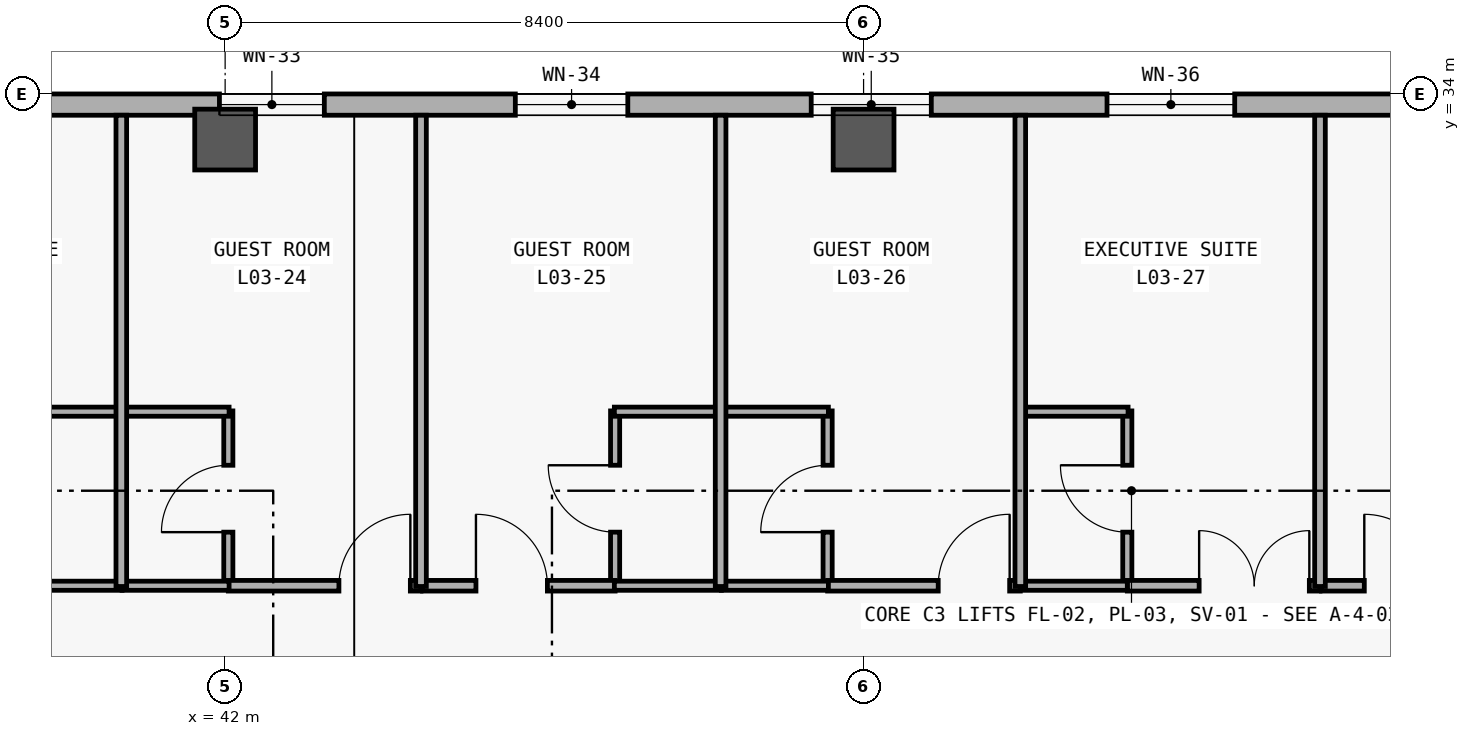
"""IFC4 building model, lengths in metres.
Left out: names, types, materials, properties, quantities, classifications, styles, units other than length and angle.
Written with IfcOpenShell. Run it as: python <this file> out.ifc"""

import sys

from ifc_helpers import new_model, si_unit, direction, frame, frame_2d, origin, origin_2d, place, context, subcontext, project, spatial, rectangle, extrude, element, fill, save


model = new_model("IFC4")
c1 = context("Model", 3, precision=1e-05, world=origin(), true_north=direction((0.0, 1.0)))
c2 = subcontext(c1, "Body", "Model", "MODEL_VIEW")
j1 = project(units=[si_unit("LENGTHUNIT", "METRE"), si_unit("PLANEANGLEUNIT", "RADIAN")], contexts=[c1])
p1 = place(None, origin())
s1 = spatial("IfcSite", under=j1, at=p1, CompositionType="ELEMENT")
p2 = place(p1, origin())
s2 = spatial("IfcBuilding", under=s1, at=p2, CompositionType="ELEMENT")
p3 = place(p2, frame((0.0, 0.0, 15.0)))
s3 = spatial("IfcBuildingStorey", under=s2, at=p3, CompositionType="ELEMENT", Elevation=15.0)
for number, where, z_axis, x_axis in (
    (1, (42.0, 33.4, 0.0), (0.0, 0.0, 1.0), (1.0, 0.0, 0.0)),
    (2, (50.4, 33.4, 0.0), (0.0, 0.0, 1.0), (1.0, 0.0, 0.0)),
):
    element("IfcColumn", number, at=place(p3, frame(where, z_axis=z_axis, x_axis=x_axis)), inside=s3, PredefinedType="COLUMN", context=c2, shape_type="SweptSolid", body=[
        extrude(rectangle(XDim=0.8, YDim=0.8, at=origin_2d()), origin(), (0.0, 0.0, 1.0), 4.2),
    ])
p4 = place(p3, frame((8.68, 33.86, 0.0), z_axis=(0.0, 0.0, 1.0), x_axis=(1.0, 0.0, 0.0)))
e3 = element("IfcWall", 3, at=p4, inside=s3, PredefinedType="SOLIDWALL", context=c2, shape_type="SweptSolid", body=[
    extrude(rectangle(XDim=83.44, YDim=0.28, at=frame_2d((41.72, 0.0))), origin(), (0.0, 0.0, 1.0), 3.92),
])
p5 = place(p4, frame((4.895, 0.0, 0.85)))
e4 = element("IfcOpeningElement", 4, at=p5, cuts=e3, PredefinedType="OPENING", context=c2, shape_type="SweptSolid", body=[
    extrude(rectangle(XDim=2.6, YDim=2.2, at=frame_2d((1.3, 1.1))), frame((0.0, 0.15, 0.0), z_axis=(0.0, -1.0, 0.0), x_axis=(1.0, 0.0, 0.0)), (0.0, 0.0, 1.0), 0.3),
])
p6 = place(p4, frame((13.371, 0.0, 0.85)))
e5 = element("IfcOpeningElement", 5, at=p6, cuts=e3, PredefinedType="OPENING", context=c2, shape_type="SweptSolid", body=[
    extrude(rectangle(XDim=1.7, YDim=2.0, at=frame_2d((0.85, 1.0))), frame((0.0, 0.15, 0.0), z_axis=(0.0, -1.0, 0.0), x_axis=(1.0, 0.0, 0.0)), (0.0, 0.0, 1.0), 0.3),
])
p7 = place(p4, frame((17.015, 0.0, 0.85)))
e6 = element("IfcOpeningElement", 6, at=p7, cuts=e3, PredefinedType="OPENING", context=c2, shape_type="SweptSolid", body=[
    extrude(rectangle(XDim=2.3, YDim=2.05, at=frame_2d((1.15, 1.025))), frame((0.0, 0.15, 0.0), z_axis=(0.0, -1.0, 0.0), x_axis=(1.0, 0.0, 0.0)), (0.0, 0.0, 1.0), 0.3),
])
p8 = place(p4, frame((20.732, 0.0, 0.85)))
e7 = element("IfcOpeningElement", 7, at=p8, cuts=e3, PredefinedType="OPENING", context=c2, shape_type="SweptSolid", body=[
    extrude(rectangle(XDim=2.75, YDim=2.1, at=frame_2d((1.375, 1.05))), frame((0.0, 0.15, 0.0), z_axis=(0.0, -1.0, 0.0), x_axis=(1.0, 0.0, 0.0)), (0.0, 0.0, 1.0), 0.3),
])
p9 = place(p4, frame((25.46, 0.0, 0.85)))
e8 = element("IfcOpeningElement", 8, at=p9, cuts=e3, PredefinedType="OPENING", context=c2, shape_type="SweptSolid", body=[
    extrude(rectangle(XDim=1.18, YDim=1.5, at=frame_2d((0.59, 0.75))), frame((0.0, 0.15, 0.0), z_axis=(0.0, -1.0, 0.0), x_axis=(1.0, 0.0, 0.0)), (0.0, 0.0, 1.0), 0.3),
])
p10 = place(p4, frame((29.352, 0.0, 0.85)))
e9 = element("IfcOpeningElement", 9, at=p10, cuts=e3, PredefinedType="OPENING", context=c2, shape_type="SweptSolid", body=[
    extrude(rectangle(XDim=1.28, YDim=1.6, at=frame_2d((0.64, 0.8))), frame((0.0, 0.15, 0.0), z_axis=(0.0, -1.0, 0.0), x_axis=(1.0, 0.0, 0.0)), (0.0, 0.0, 1.0), 0.3),
])
p11 = place(p4, frame((33.245, 0.0, 0.85)))
e10 = element("IfcOpeningElement", 10, at=p11, cuts=e3, PredefinedType="OPENING", context=c2, shape_type="SweptSolid", body=[
    extrude(rectangle(XDim=1.38, YDim=1.7, at=frame_2d((0.69, 0.85))), frame((0.0, 0.15, 0.0), z_axis=(0.0, -1.0, 0.0), x_axis=(1.0, 0.0, 0.0)), (0.0, 0.0, 1.0), 0.3),
])
p12 = place(p4, frame((37.138, 0.0, 0.85)))
e11 = element("IfcOpeningElement", 11, at=p12, cuts=e3, PredefinedType="OPENING", context=c2, shape_type="SweptSolid", body=[
    extrude(rectangle(XDim=1.48, YDim=1.8, at=frame_2d((0.74, 0.9))), frame((0.0, 0.15, 0.0), z_axis=(0.0, -1.0, 0.0), x_axis=(1.0, 0.0, 0.0)), (0.0, 0.0, 1.0), 0.3),
])
p13 = place(p4, frame((41.031, 0.0, 0.85)))
e12 = element("IfcOpeningElement", 12, at=p13, cuts=e3, PredefinedType="OPENING", context=c2, shape_type="SweptSolid", body=[
    extrude(rectangle(XDim=1.58, YDim=1.85, at=frame_2d((0.79, 0.925))), frame((0.0, 0.15, 0.0), z_axis=(0.0, -1.0, 0.0), x_axis=(1.0, 0.0, 0.0)), (0.0, 0.0, 1.0), 0.3),
])
p14 = place(p4, frame((44.923, 0.0, 0.85)))
e13 = element("IfcOpeningElement", 13, at=p14, cuts=e3, PredefinedType="OPENING", context=c2, shape_type="SweptSolid", body=[
    extrude(rectangle(XDim=1.68, YDim=1.9, at=frame_2d((0.84, 0.95))), frame((0.0, 0.15, 0.0), z_axis=(0.0, -1.0, 0.0), x_axis=(1.0, 0.0, 0.0)), (0.0, 0.0, 1.0), 0.3),
])
p15 = place(p4, frame((48.816, 0.0, 0.85)))
e14 = element("IfcOpeningElement", 14, at=p15, cuts=e3, PredefinedType="OPENING", context=c2, shape_type="SweptSolid", body=[
    extrude(rectangle(XDim=1.78, YDim=1.95, at=frame_2d((0.89, 0.975))), frame((0.0, 0.15, 0.0), z_axis=(0.0, -1.0, 0.0), x_axis=(1.0, 0.0, 0.0)), (0.0, 0.0, 1.0), 0.3),
])
p16 = place(p4, frame((52.71, 0.0, 0.85)))
e15 = element("IfcOpeningElement", 15, at=p16, cuts=e3, PredefinedType="OPENING", context=c2, shape_type="SweptSolid", body=[
    extrude(rectangle(XDim=1.88, YDim=1.95, at=frame_2d((0.94, 0.975))), frame((0.0, 0.15, 0.0), z_axis=(0.0, -1.0, 0.0), x_axis=(1.0, 0.0, 0.0)), (0.0, 0.0, 1.0), 0.3),
])
p17 = place(p4, frame((56.567, 0.0, 0.85)))
e16 = element("IfcOpeningElement", 16, at=p17, cuts=e3, PredefinedType="OPENING", context=c2, shape_type="SweptSolid", body=[
    extrude(rectangle(XDim=2.05, YDim=1.95, at=frame_2d((1.025, 0.975))), frame((0.0, 0.15, 0.0), z_axis=(0.0, -1.0, 0.0), x_axis=(1.0, 0.0, 0.0)), (0.0, 0.0, 1.0), 0.3),
])
p18 = place(p4, frame((60.444, 0.0, 0.85)))
e17 = element("IfcOpeningElement", 17, at=p18, cuts=e3, PredefinedType="OPENING", context=c2, shape_type="SweptSolid", body=[
    extrude(rectangle(XDim=2.18, YDim=1.95, at=frame_2d((1.09, 0.975))), frame((0.0, 0.15, 0.0), z_axis=(0.0, -1.0, 0.0), x_axis=(1.0, 0.0, 0.0)), (0.0, 0.0, 1.0), 0.3),
])
p19 = place(p4, frame((64.287, 0.0, 0.85)))
e18 = element("IfcOpeningElement", 18, at=p19, cuts=e3, PredefinedType="OPENING", context=c2, shape_type="SweptSolid", body=[
    extrude(rectangle(XDim=2.38, YDim=1.95, at=frame_2d((1.19, 0.975))), frame((0.0, 0.15, 0.0), z_axis=(0.0, -1.0, 0.0), x_axis=(1.0, 0.0, 0.0)), (0.0, 0.0, 1.0), 0.3),
])
p20 = place(p4, frame((68.181, 0.0, 0.85)))
e19 = element("IfcOpeningElement", 19, at=p20, cuts=e3, PredefinedType="OPENING", context=c2, shape_type="SweptSolid", body=[
    extrude(rectangle(XDim=2.48, YDim=2.0, at=frame_2d((1.24, 1.0))), frame((0.0, 0.15, 0.0), z_axis=(0.0, -1.0, 0.0), x_axis=(1.0, 0.0, 0.0)), (0.0, 0.0, 1.0), 0.3),
])
p21 = place(p4, frame((72.038, 0.0, 0.85)))
e20 = element("IfcOpeningElement", 20, at=p21, cuts=e3, PredefinedType="OPENING", context=c2, shape_type="SweptSolid", body=[
    extrude(rectangle(XDim=2.65, YDim=2.0, at=frame_2d((1.325, 1.0))), frame((0.0, 0.15, 0.0), z_axis=(0.0, -1.0, 0.0), x_axis=(1.0, 0.0, 0.0)), (0.0, 0.0, 1.0), 0.3),
])
p22 = place(p4, frame((75.831, 0.0, 0.85)))
e21 = element("IfcOpeningElement", 21, at=p22, cuts=e3, PredefinedType="OPENING", context=c2, shape_type="SweptSolid", body=[
    extrude(rectangle(XDim=2.95, YDim=2.05, at=frame_2d((1.475, 1.025))), frame((0.0, 0.15, 0.0), z_axis=(0.0, -1.0, 0.0), x_axis=(1.0, 0.0, 0.0)), (0.0, 0.0, 1.0), 0.3),
])
p23 = place(p4, frame((80.349, 0.0, 0.85)))
e22 = element("IfcOpeningElement", 22, at=p23, cuts=e3, PredefinedType="OPENING", context=c2, shape_type="SweptSolid", body=[
    extrude(rectangle(XDim=1.8, YDim=1.8, at=frame_2d((0.9, 0.9))), frame((0.0, 0.15, 0.0), z_axis=(0.0, -1.0, 0.0), x_axis=(1.0, 0.0, 0.0)), (0.0, 0.0, 1.0), 0.3),
])
p24 = place(p3, frame((42.042, 27.52, 0.0), z_axis=(0.0, 0.0, 1.0), x_axis=(0.0, 1.0, 0.0)))
e23 = element("IfcWall", 23, at=p24, inside=s3, PredefinedType="PARTITIONING", context=c2, shape_type="SweptSolid", body=[
    extrude(rectangle(XDim=2.31, YDim=0.12, at=frame_2d((1.155, 0.0))), origin(), (0.0, 0.0, 1.0), 3.02),
])
p25 = place(p24, frame((0.715, 0.0, 0.0)))
e24 = element("IfcOpeningElement", 24, at=p25, cuts=e23, PredefinedType="OPENING", context=c2, shape_type="SweptSolid", body=[
    extrude(rectangle(XDim=0.88, YDim=2.15, at=frame_2d((0.44, 1.075))), frame((0.0, 0.07, 0.0), z_axis=(0.0, -1.0, 0.0), x_axis=(1.0, 0.0, 0.0)), (0.0, 0.0, 1.0), 0.14),
])
p26 = place(p3, frame((47.131, 27.52, 0.0), z_axis=(0.0, 0.0, 1.0), x_axis=(0.0, 1.0, 0.0)))
e25 = element("IfcWall", 25, at=p26, inside=s3, PredefinedType="PARTITIONING", context=c2, shape_type="SweptSolid", body=[
    extrude(rectangle(XDim=2.31, YDim=0.12, at=frame_2d((1.155, 0.0))), origin(), (0.0, 0.0, 1.0), 3.02),
])
p27 = place(p26, frame((0.715, 0.0, 0.0)))
e26 = element("IfcOpeningElement", 26, at=p27, cuts=e25, PredefinedType="OPENING", context=c2, shape_type="SweptSolid", body=[
    extrude(rectangle(XDim=0.88, YDim=2.15, at=frame_2d((0.44, 1.075))), frame((0.0, 0.07, 0.0), z_axis=(0.0, -1.0, 0.0), x_axis=(1.0, 0.0, 0.0)), (0.0, 0.0, 1.0), 0.14),
])
p28 = place(p3, frame((49.927, 27.52, 0.0), z_axis=(0.0, 0.0, 1.0), x_axis=(0.0, 1.0, 0.0)))
e27 = element("IfcWall", 27, at=p28, inside=s3, PredefinedType="PARTITIONING", context=c2, shape_type="SweptSolid", body=[
    extrude(rectangle(XDim=2.31, YDim=0.12, at=frame_2d((1.155, 0.0))), origin(), (0.0, 0.0, 1.0), 3.02),
])
p29 = place(p28, frame((0.715, 0.0, 0.0)))
e28 = element("IfcOpeningElement", 28, at=p29, cuts=e27, PredefinedType="OPENING", context=c2, shape_type="SweptSolid", body=[
    extrude(rectangle(XDim=0.88, YDim=2.15, at=frame_2d((0.44, 1.075))), frame((0.0, 0.07, 0.0), z_axis=(0.0, -1.0, 0.0), x_axis=(1.0, 0.0, 0.0)), (0.0, 0.0, 1.0), 0.14),
])
p30 = place(p3, frame((53.87, 27.52, 0.0), z_axis=(0.0, 0.0, 1.0), x_axis=(0.0, 1.0, 0.0)))
e29 = element("IfcWall", 29, at=p30, inside=s3, PredefinedType="PARTITIONING", context=c2, shape_type="SweptSolid", body=[
    extrude(rectangle(XDim=2.31, YDim=0.12, at=frame_2d((1.155, 0.0))), origin(), (0.0, 0.0, 1.0), 3.02),
])
p31 = place(p30, frame((0.715, 0.0, 0.0)))
e30 = element("IfcOpeningElement", 30, at=p31, cuts=e29, PredefinedType="OPENING", context=c2, shape_type="SweptSolid", body=[
    extrude(rectangle(XDim=0.88, YDim=2.15, at=frame_2d((0.44, 1.075))), frame((0.0, 0.07, 0.0), z_axis=(0.0, -1.0, 0.0), x_axis=(1.0, 0.0, 0.0)), (0.0, 0.0, 1.0), 0.14),
])
p32 = place(p3, frame((42.042, 27.53, 0.0), z_axis=(0.0, 0.0, 1.0), x_axis=(1.0, 0.0, 0.0)))
e31 = element("IfcWall", 31, at=p32, inside=s3, PredefinedType="PARTITIONING", context=c2, shape_type="SweptSolid", body=[
    extrude(rectangle(XDim=2.535, YDim=0.14, at=frame_2d((1.268, 0.0))), origin(), (0.0, 0.0, 1.0), 3.02),
])
p33 = place(p32, frame((1.455, 0.0, 0.0)))
e32 = element("IfcOpeningElement", 32, at=p33, cuts=e31, PredefinedType="OPENING", context=c2, shape_type="SweptSolid", body=[
    extrude(rectangle(XDim=0.94, YDim=2.2, at=frame_2d((0.47, 1.1))), frame((0.0, 0.08, 0.0), z_axis=(0.0, -1.0, 0.0), x_axis=(1.0, 0.0, 0.0)), (0.0, 0.0, 1.0), 0.16),
])
p34 = place(p3, frame((44.597, 27.53, 0.0), z_axis=(0.0, 0.0, 1.0), x_axis=(1.0, 0.0, 0.0)))
e33 = element("IfcWall", 33, at=p34, inside=s3, PredefinedType="PARTITIONING", context=c2, shape_type="SweptSolid", body=[
    extrude(rectangle(XDim=2.534, YDim=0.14, at=frame_2d((1.267, 0.0))), origin(), (0.0, 0.0, 1.0), 3.02),
])
p35 = place(p34, frame((0.703, 0.0, 0.0)))
e34 = element("IfcOpeningElement", 34, at=p35, cuts=e33, PredefinedType="OPENING", context=c2, shape_type="SweptSolid", body=[
    extrude(rectangle(XDim=0.94, YDim=2.2, at=frame_2d((0.47, 1.1))), frame((0.0, 0.08, 0.0), z_axis=(0.0, -1.0, 0.0), x_axis=(1.0, 0.0, 0.0)), (0.0, 0.0, 1.0), 0.16),
])
p36 = place(p3, frame((49.927, 27.53, 0.0), z_axis=(0.0, 0.0, 1.0), x_axis=(1.0, 0.0, 0.0)))
e35 = element("IfcWall", 35, at=p36, inside=s3, PredefinedType="PARTITIONING", context=c2, shape_type="SweptSolid", body=[
    extrude(rectangle(XDim=2.535, YDim=0.14, at=frame_2d((1.268, 0.0))), origin(), (0.0, 0.0, 1.0), 3.02),
])
p37 = place(p36, frame((1.455, 0.0, 0.0)))
e36 = element("IfcOpeningElement", 36, at=p37, cuts=e35, PredefinedType="OPENING", context=c2, shape_type="SweptSolid", body=[
    extrude(rectangle(XDim=0.94, YDim=2.2, at=frame_2d((0.47, 1.1))), frame((0.0, 0.08, 0.0), z_axis=(0.0, -1.0, 0.0), x_axis=(1.0, 0.0, 0.0)), (0.0, 0.0, 1.0), 0.16),
])
p38 = place(p3, frame((53.87, 27.53, 0.0), z_axis=(0.0, 0.0, 1.0), x_axis=(1.0, 0.0, 0.0)))
e37 = element("IfcWall", 37, at=p38, inside=s3, PredefinedType="PARTITIONING", context=c2, shape_type="SweptSolid", body=[
    extrude(rectangle(XDim=2.535, YDim=0.14, at=frame_2d((1.268, 0.0))), origin(), (0.0, 0.0, 1.0), 3.02),
])
p39 = place(p38, frame((0.945, 0.0, 0.0)))
e38 = element("IfcOpeningElement", 38, at=p39, cuts=e37, PredefinedType="OPENING", context=c2, shape_type="SweptSolid", body=[
    extrude(rectangle(XDim=1.45, YDim=2.3, at=frame_2d((0.725, 1.15))), frame((0.0, 0.08, 0.0), z_axis=(0.0, -1.0, 0.0), x_axis=(1.0, 0.0, 0.0)), (0.0, 0.0, 1.0), 0.16),
])
p40 = place(p3, frame((56.425, 27.53, 0.0), z_axis=(0.0, 0.0, 1.0), x_axis=(1.0, 0.0, 0.0)))
e39 = element("IfcWall", 39, at=p40, inside=s3, PredefinedType="PARTITIONING", context=c2, shape_type="SweptSolid", body=[
    extrude(rectangle(XDim=2.535, YDim=0.14, at=frame_2d((1.268, 0.0))), origin(), (0.0, 0.0, 1.0), 3.02),
])
p41 = place(p40, frame((0.563, 0.0, 0.0)))
e40 = element("IfcOpeningElement", 40, at=p41, cuts=e39, PredefinedType="OPENING", context=c2, shape_type="SweptSolid", body=[
    extrude(rectangle(XDim=0.94, YDim=2.2, at=frame_2d((0.47, 1.1))), frame((0.0, 0.08, 0.0), z_axis=(0.0, -1.0, 0.0), x_axis=(1.0, 0.0, 0.0)), (0.0, 0.0, 1.0), 0.16),
])
p42 = place(p3, frame((39.246, 27.53, 0.0), z_axis=(0.0, 0.0, 1.0), x_axis=(1.0, 0.0, 0.0)))
e41 = element("IfcWall", 41, at=p42, inside=s3, PredefinedType="PARTITIONING", context=c2, shape_type="SweptSolid", body=[
    extrude(rectangle(XDim=1.398, YDim=0.12, at=frame_2d((0.699, 0.0))), origin(), (0.0, 0.0, 1.0), 3.02),
])
for number, where, z_axis, x_axis in (
    (42, (39.236, 29.82, 0.0), (0.0, 0.0, 1.0), (1.0, 0.0, 0.0)),
    (43, (40.644, 27.53, 0.0), (0.0, 0.0, 1.0), (1.0, 0.0, 0.0)),
    (44, (40.644, 29.82, 0.0), (0.0, 0.0, 1.0), (1.0, 0.0, 0.0)),
    (45, (47.121, 27.53, 0.0), (0.0, 0.0, 1.0), (1.0, 0.0, 0.0)),
    (46, (47.121, 29.82, 0.0), (0.0, 0.0, 1.0), (1.0, 0.0, 0.0)),
    (47, (48.529, 27.53, 0.0), (0.0, 0.0, 1.0), (1.0, 0.0, 0.0)),
    (48, (48.529, 29.82, 0.0), (0.0, 0.0, 1.0), (1.0, 0.0, 0.0)),
):
    element("IfcWall", number, at=place(p3, frame(where, z_axis=z_axis, x_axis=x_axis)), inside=s3, PredefinedType="PARTITIONING", context=c2, shape_type="SweptSolid", body=[
        extrude(rectangle(XDim=1.408, YDim=0.12, at=frame_2d((0.704, 0.0))), origin(), (0.0, 0.0, 1.0), 3.02),
    ])
p43 = place(p3, frame((52.472, 27.53, 0.0), z_axis=(0.0, 0.0, 1.0), x_axis=(1.0, 0.0, 0.0)))
e49 = element("IfcWall", 49, at=p43, inside=s3, PredefinedType="PARTITIONING", context=c2, shape_type="SweptSolid", body=[
    extrude(rectangle(XDim=1.398, YDim=0.12, at=frame_2d((0.699, 0.0))), origin(), (0.0, 0.0, 1.0), 3.02),
])
p44 = place(p3, frame((52.472, 29.82, 0.0), z_axis=(0.0, 0.0, 1.0), x_axis=(1.0, 0.0, 0.0)))
e50 = element("IfcWall", 50, at=p44, inside=s3, PredefinedType="PARTITIONING", context=c2, shape_type="SweptSolid", body=[
    extrude(rectangle(XDim=1.408, YDim=0.12, at=frame_2d((0.704, 0.0))), origin(), (0.0, 0.0, 1.0), 3.02),
])
for number, where, z_axis, x_axis in (
    (51, (40.634, 27.52, 0.0), (0.0, 0.0, 1.0), (0.0, 1.0, 0.0)),
    (52, (44.577, 27.52, 0.0), (0.0, 0.0, 1.0), (0.0, 1.0, 0.0)),
    (53, (48.519, 27.52, 0.0), (0.0, 0.0, 1.0), (0.0, 1.0, 0.0)),
    (54, (52.462, 27.52, 0.0), (0.0, 0.0, 1.0), (0.0, 1.0, 0.0)),
    (55, (56.405, 27.52, 0.0), (0.0, 0.0, 1.0), (0.0, 1.0, 0.0)),
):
    element("IfcWall", number, at=place(p3, frame(where, z_axis=z_axis, x_axis=x_axis)), inside=s3, PredefinedType="PARTITIONING", context=c2, shape_type="SweptSolid", body=[
        extrude(rectangle(XDim=6.2, YDim=0.14, at=frame_2d((3.1, 0.0))), origin(), (0.0, 0.0, 1.0), 3.02),
    ])
p45 = place(p11, origin())
e56 = element("IfcWindow", 56, at=p45, inside=s3, PartitioningType="SINGLE_PANEL", PredefinedType="WINDOW", context=c2, shape_type="SweptSolid", body=[
    extrude(rectangle(XDim=1.38, YDim=1.7, at=frame_2d((0.69, 0.85))), frame((0.0, 0.03, 0.0), z_axis=(0.0, -1.0, 0.0), x_axis=(1.0, 0.0, 0.0)), (0.0, 0.0, 1.0), 0.06),
])
fill(e10, e56)
p46 = place(p12, origin())
e57 = element("IfcWindow", 57, at=p46, inside=s3, PartitioningType="SINGLE_PANEL", PredefinedType="WINDOW", context=c2, shape_type="SweptSolid", body=[
    extrude(rectangle(XDim=1.48, YDim=1.8, at=frame_2d((0.74, 0.9))), frame((0.0, 0.03, 0.0), z_axis=(0.0, -1.0, 0.0), x_axis=(1.0, 0.0, 0.0)), (0.0, 0.0, 1.0), 0.06),
])
fill(e11, e57)
p47 = place(p13, origin())
e58 = element("IfcWindow", 58, at=p47, inside=s3, PartitioningType="SINGLE_PANEL", PredefinedType="WINDOW", context=c2, shape_type="SweptSolid", body=[
    extrude(rectangle(XDim=1.58, YDim=1.85, at=frame_2d((0.79, 0.925))), frame((0.0, 0.03, 0.0), z_axis=(0.0, -1.0, 0.0), x_axis=(1.0, 0.0, 0.0)), (0.0, 0.0, 1.0), 0.06),
])
fill(e12, e58)
p48 = place(p14, origin())
e59 = element("IfcWindow", 59, at=p48, inside=s3, PartitioningType="SINGLE_PANEL", PredefinedType="WINDOW", context=c2, shape_type="SweptSolid", body=[
    extrude(rectangle(XDim=1.68, YDim=1.9, at=frame_2d((0.84, 0.95))), frame((0.0, 0.03, 0.0), z_axis=(0.0, -1.0, 0.0), x_axis=(1.0, 0.0, 0.0)), (0.0, 0.0, 1.0), 0.06),
])
fill(e13, e59)
p49 = place(p25, origin())
e60 = element("IfcDoor", 60, at=p49, inside=s3, OperationType="SINGLE_SWING_LEFT", PredefinedType="DOOR", context=c2, shape_type="SweptSolid", body=[
    extrude(rectangle(XDim=0.88, YDim=2.15, at=frame_2d((0.44, 1.075))), frame((0.0, 0.025, 0.0), z_axis=(0.0, -1.0, 0.0), x_axis=(1.0, 0.0, 0.0)), (0.0, 0.0, 1.0), 0.05),
])
fill(e24, e60)
p50 = place(p27, origin())
e61 = element("IfcDoor", 61, at=p50, inside=s3, OperationType="SINGLE_SWING_RIGHT", PredefinedType="DOOR", context=c2, shape_type="SweptSolid", body=[
    extrude(rectangle(XDim=0.88, YDim=2.15, at=frame_2d((0.44, 1.075))), frame((0.0, 0.025, 0.0), z_axis=(0.0, -1.0, 0.0), x_axis=(1.0, 0.0, 0.0)), (0.0, 0.0, 1.0), 0.05),
])
fill(e26, e61)
p51 = place(p29, origin())
e62 = element("IfcDoor", 62, at=p51, inside=s3, OperationType="SINGLE_SWING_LEFT", PredefinedType="DOOR", context=c2, shape_type="SweptSolid", body=[
    extrude(rectangle(XDim=0.88, YDim=2.15, at=frame_2d((0.44, 1.075))), frame((0.0, 0.025, 0.0), z_axis=(0.0, -1.0, 0.0), x_axis=(1.0, 0.0, 0.0)), (0.0, 0.0, 1.0), 0.05),
])
fill(e28, e62)
p52 = place(p31, origin())
e63 = element("IfcDoor", 63, at=p52, inside=s3, OperationType="SINGLE_SWING_RIGHT", PredefinedType="DOOR", context=c2, shape_type="SweptSolid", body=[
    extrude(rectangle(XDim=0.88, YDim=2.15, at=frame_2d((0.44, 1.075))), frame((0.0, 0.025, 0.0), z_axis=(0.0, -1.0, 0.0), x_axis=(1.0, 0.0, 0.0)), (0.0, 0.0, 1.0), 0.05),
])
fill(e30, e63)
p53 = place(p33, origin())
e64 = element("IfcDoor", 64, at=p53, inside=s3, OperationType="SINGLE_SWING_RIGHT", PredefinedType="DOOR", context=c2, shape_type="SweptSolid", body=[
    extrude(rectangle(XDim=0.94, YDim=2.2, at=frame_2d((0.47, 1.1))), frame((0.0, 0.025, 0.0), z_axis=(0.0, -1.0, 0.0), x_axis=(1.0, 0.0, 0.0)), (0.0, 0.0, 1.0), 0.05),
])
fill(e32, e64)
p54 = place(p35, origin())
e65 = element("IfcDoor", 65, at=p54, inside=s3, OperationType="SINGLE_SWING_LEFT", PredefinedType="DOOR", context=c2, shape_type="SweptSolid", body=[
    extrude(rectangle(XDim=0.94, YDim=2.2, at=frame_2d((0.47, 1.1))), frame((0.0, 0.025, 0.0), z_axis=(0.0, -1.0, 0.0), x_axis=(1.0, 0.0, 0.0)), (0.0, 0.0, 1.0), 0.05),
])
fill(e34, e65)
p55 = place(p37, origin())
e66 = element("IfcDoor", 66, at=p55, inside=s3, OperationType="SINGLE_SWING_RIGHT", PredefinedType="DOOR", context=c2, shape_type="SweptSolid", body=[
    extrude(rectangle(XDim=0.94, YDim=2.2, at=frame_2d((0.47, 1.1))), frame((0.0, 0.025, 0.0), z_axis=(0.0, -1.0, 0.0), x_axis=(1.0, 0.0, 0.0)), (0.0, 0.0, 1.0), 0.05),
])
fill(e36, e66)
p56 = place(p39, origin())
e67 = element("IfcDoor", 67, at=p56, inside=s3, OperationType="DOUBLE_DOOR_SINGLE_SWING", PredefinedType="DOOR", context=c2, shape_type="SweptSolid", body=[
    extrude(rectangle(XDim=1.45, YDim=2.3, at=frame_2d((0.725, 1.15))), frame((0.0, 0.025, 0.0), z_axis=(0.0, -1.0, 0.0), x_axis=(1.0, 0.0, 0.0)), (0.0, 0.0, 1.0), 0.05),
])
fill(e38, e67)
p57 = place(p41, origin())
e68 = element("IfcDoor", 68, at=p57, inside=s3, OperationType="SINGLE_SWING_LEFT", PredefinedType="DOOR", context=c2, shape_type="SweptSolid", body=[
    extrude(rectangle(XDim=0.94, YDim=2.2, at=frame_2d((0.47, 1.1))), frame((0.0, 0.025, 0.0), z_axis=(0.0, -1.0, 0.0), x_axis=(1.0, 0.0, 0.0)), (0.0, 0.0, 1.0), 0.05),
])
fill(e40, e68)
save(model, sys.argv[1])
